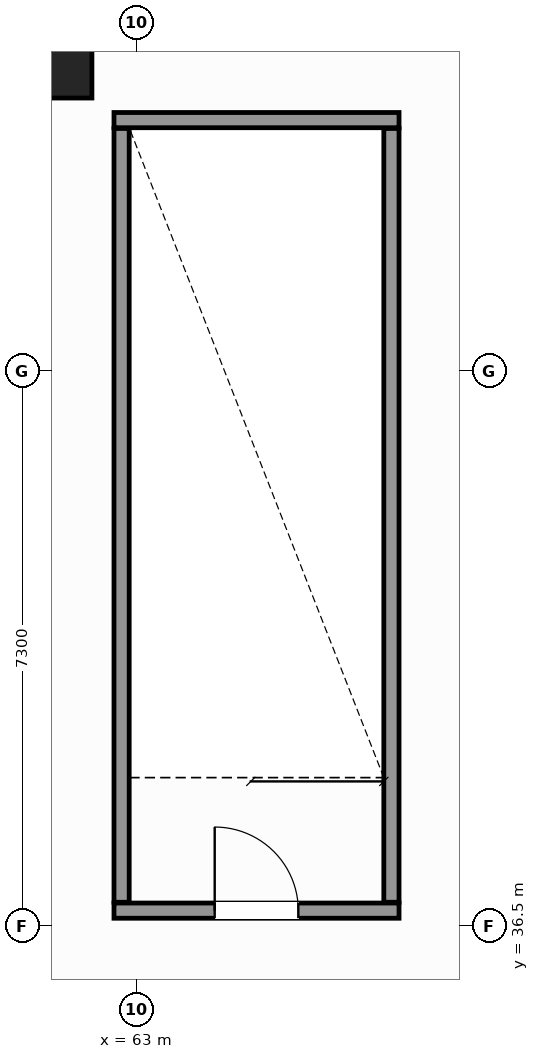
"""IFC4 building model, lengths in metres.
Left out: names, types, materials, properties, quantities, classifications, styles, units other than length and angle.
Written with IfcOpenShell. Run it as: python <this file> out.ifc"""

import sys

from ifc_helpers import new_model, si_unit, direction, frame, frame_2d, origin, origin_2d, place, context, subcontext, project, spatial, rectangle, hollow_circle, extrude, source, transform, mapped, element, fill, save


model = new_model("IFC4")
c1 = context("Model", 3, precision=1e-05, world=origin(), true_north=direction((0.0, 1.0)))
c2 = subcontext(c1, "Body", "Model", "MODEL_VIEW")
j1 = project(units=[si_unit("LENGTHUNIT", "METRE"), si_unit("PLANEANGLEUNIT", "RADIAN")], contexts=[c1])
p1 = place(None, origin())
s1 = spatial("IfcSite", under=j1, at=p1, CompositionType="ELEMENT")
p2 = place(p1, origin())
s2 = spatial("IfcBuilding", under=s1, at=p2, CompositionType="ELEMENT")
p3 = place(p2, frame((0.0, 0.0, 14.4)))
s3 = spatial("IfcBuildingStorey", under=s2, at=p3, CompositionType="ELEMENT", Elevation=14.4)
m1 = source(origin(), c2, "Body", "SweptSolid", [
    extrude(hollow_circle(Radius=0.61, WallThickness=0.05, at=origin_2d()), origin(), (0.0, 0.0, 1.0), 4.4),
])
p4 = place(p3, frame((61.8, 48.0, 0.0), z_axis=(0.0, 0.0, 1.0), x_axis=(1.0, 0.0, 0.0)))
e1 = element("IfcColumn", 1, at=p4, inside=s3, PredefinedType="COLUMN", context=c2, shape_type="MappedRepresentation", body=[
    mapped(m1, transform((0.0, 0.0, 0.0), scale=1.0)),
])
p5 = place(p3, frame((62.7, 36.7, 0.0), z_axis=(0.0, 0.0, 1.0), x_axis=(1.0, 0.0, 0.0)))
e2 = element("IfcWall", 2, at=p5, inside=s3, PredefinedType="SOLIDWALL", context=c2, shape_type="SweptSolid", body=[
    extrude(rectangle(XDim=3.75, YDim=0.2, at=frame_2d((1.875, 0.0))), origin(), (0.0, 0.0, 1.0), 4.4),
])
p6 = place(p5, frame((1.325, 0.0, 0.0)))
e3 = element("IfcOpeningElement", 3, at=p6, cuts=e2, PredefinedType="OPENING", context=c2, shape_type="SweptSolid", body=[
    extrude(rectangle(XDim=1.1, YDim=2.15, at=frame_2d((0.55, 1.075))), frame((0.0, 0.11, 0.0), z_axis=(0.0, -1.0, 0.0), x_axis=(1.0, 0.0, 0.0)), (0.0, 0.0, 1.0), 0.22),
])
p7 = place(p3, frame((62.7, 47.1, 0.0), z_axis=(0.0, 0.0, 1.0), x_axis=(1.0, 0.0, 0.0)))
e4 = element("IfcWall", 4, at=p7, inside=s3, PredefinedType="SOLIDWALL", context=c2, shape_type="SweptSolid", body=[
    extrude(rectangle(XDim=3.75, YDim=0.2, at=frame_2d((1.875, 0.0))), origin(), (0.0, 0.0, 1.0), 4.4),
])
for number, where, z_axis, x_axis in (
    (5, (62.8, 36.81, 0.0), (0.0, 0.0, 1.0), (0.0, 1.0, 0.0)),
    (6, (66.35, 36.81, 0.0), (0.0, 0.0, 1.0), (0.0, 1.0, 0.0)),
):
    element("IfcWall", number, at=place(p3, frame(where, z_axis=z_axis, x_axis=x_axis)), inside=s3, PredefinedType="SOLIDWALL", context=c2, shape_type="SweptSolid", body=[
        extrude(rectangle(XDim=10.18, YDim=0.2, at=frame_2d((5.09, 0.0))), origin(), (0.0, 0.0, 1.0), 4.4),
    ])
m2 = source(origin(), c2, "Body", "SweptSolid", [
    extrude(rectangle(XDim=1.1, YDim=2.15, at=frame_2d((0.55, 1.075))), frame((0.0, 0.025, 0.0), z_axis=(0.0, -1.0, 0.0), x_axis=(1.0, 0.0, 0.0)), (0.0, 0.0, 1.0), 0.05),
])
p8 = place(p6, origin())
e7 = element("IfcDoor", 7, at=p8, inside=s3, OperationType="SINGLE_SWING_RIGHT", PredefinedType="DOOR", context=c2, shape_type="MappedRepresentation", body=[
    mapped(m2, transform((0.0, 0.0, 0.0), scale=1.0)),
])
fill(e3, e7)
save(model, sys.argv[1])
